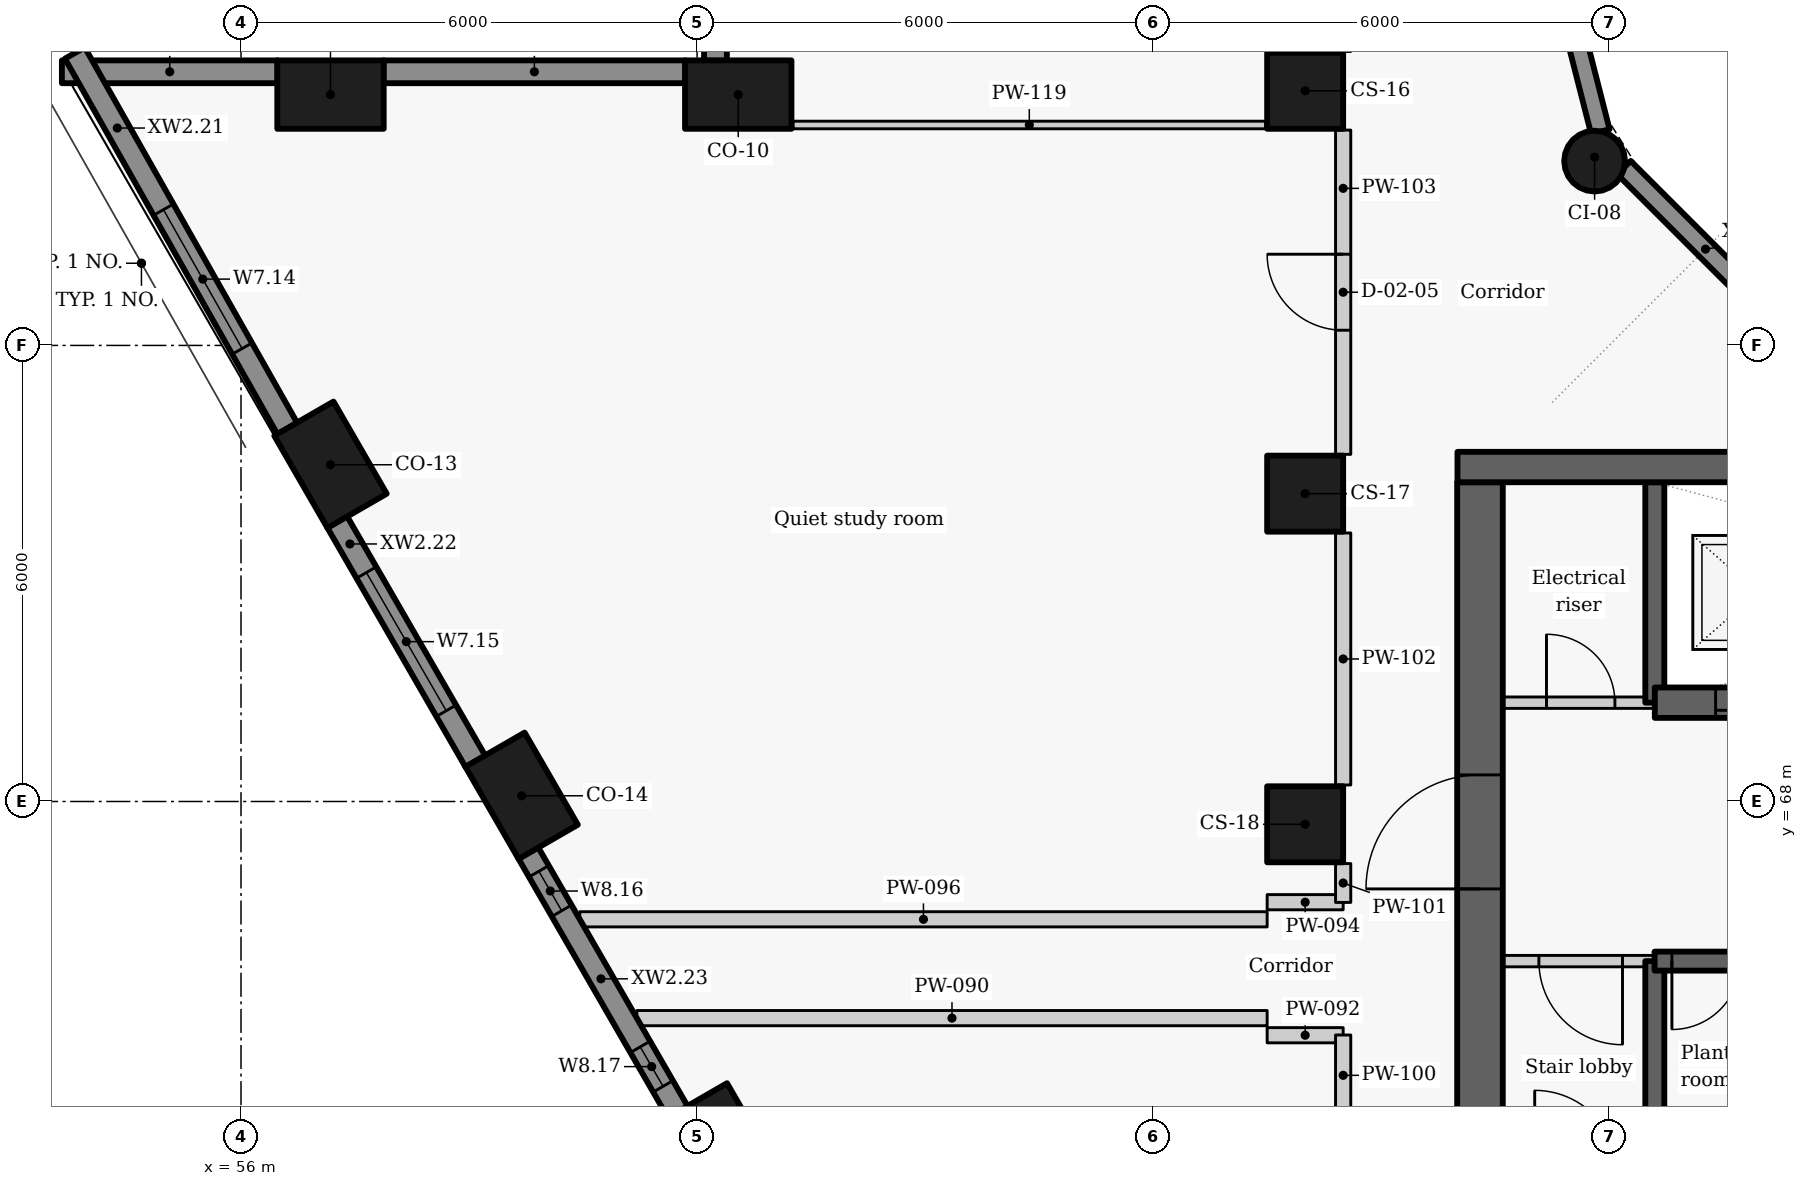
"""IFC4 building model, lengths in metres.
Left out: names, types, materials, properties, quantities, classifications, styles, units other than length and angle.
Written with IfcOpenShell. Run it as: python <this file> out.ifc"""

import sys

from ifc_helpers import new_model, si_unit, direction, frame, frame_2d, origin, origin_2d, place, context, subcontext, project, spatial, rectangle, circle, extrude, element, fill, save


model = new_model("IFC4")
c1 = context("Model", 3, precision=1e-05, world=origin(), true_north=direction((0.0, 1.0)))
c2 = subcontext(c1, "Body", "Model", "MODEL_VIEW")
j1 = project(units=[si_unit("LENGTHUNIT", "METRE"), si_unit("PLANEANGLEUNIT", "RADIAN")], contexts=[c1])
p1 = place(None, origin())
s1 = spatial("IfcSite", under=j1, at=p1, CompositionType="ELEMENT")
p2 = place(p1, origin())
s2 = spatial("IfcBuilding", under=s1, at=p2, CompositionType="ELEMENT")
p3 = place(p2, frame((0.0, 0.0, 117.3)))
s3 = spatial("IfcBuildingStorey", under=s2, at=p3, CompositionType="ELEMENT", Elevation=117.3)
for number, where, z_axis, x_axis in (
    (1, (62.542, 77.3, 0.0), (0.0, 0.0, 1.0), (-1.0, 0.0, 0.0)),
    (2, (57.177, 77.3, 0.0), (0.0, 0.0, 1.0), (-1.0, 0.0, 0.0)),
    (3, (57.177, 72.43, 0.0), (0.0, 0.0, 1.0), (0.5, -0.866, 0.0)),
    (4, (59.692, 68.075, 0.0), (0.0, 0.0, 1.0), (0.5, -0.866, 0.0)),
    (5, (62.354, 63.463, 0.0), (0.0, 0.0, 1.0), (0.5, -0.866, 0.0)),
):
    element("IfcColumn", number, at=place(p3, frame(where, z_axis=z_axis, x_axis=x_axis)), inside=s3, PredefinedType="COLUMN", context=c2, shape_type="SweptSolid", body=[
        extrude(rectangle(XDim=1.4, YDim=0.9, at=origin_2d()), origin(), (0.0, 0.0, 1.0), 3.3),
    ])
for number, where, z_axis, x_axis in (
    (6, (70.0, 77.35, 0.0), (0.0, 0.0, 1.0), (0.0, -1.0, 0.0)),
    (7, (70.0, 72.05, 0.0), (0.0, 0.0, 1.0), (0.0, -1.0, 0.0)),
    (8, (70.0, 67.7, 0.0), (0.0, 0.0, 1.0), (0.0, -1.0, 0.0)),
):
    element("IfcColumn", number, at=place(p3, frame(where, z_axis=z_axis, x_axis=x_axis)), inside=s3, PredefinedType="COLUMN", context=c2, shape_type="SweptSolid", body=[
        extrude(rectangle(XDim=1.0, YDim=1.0, at=origin_2d()), origin(), (0.0, 0.0, 1.0), 3.3),
    ])
p4 = place(p3, frame((73.808, 76.425, 0.0), z_axis=(0.0, 0.0, 1.0), x_axis=(0.5, -0.866025403784, 0.0)))
e9 = element("IfcColumn", 9, at=p4, inside=s3, PredefinedType="COLUMN", context=c2, shape_type="SweptSolid", body=[
    extrude(circle(Radius=0.4, at=origin_2d()), origin(), (0.0, 0.0, 1.0), 3.3),
])
p5 = place(p3, frame((62.242, 82.004, 0.0), z_axis=(0.0, 0.0, 1.0), x_axis=(0.0, -1.0, 0.0)))
e10 = element("IfcWall", 10, at=p5, inside=s3, PredefinedType="SOLIDWALL", context=c2, shape_type="SweptSolid", body=[
    extrude(rectangle(XDim=4.258, YDim=0.3, at=frame_2d((2.129, 0.0))), origin(), (0.0, 0.0, 1.0), 2.05),
])
p6 = place(p5, frame((1.079, 0.0, 0.9)))
e11 = element("IfcOpeningElement", 11, at=p6, cuts=e10, PredefinedType="OPENING", context=c2, shape_type="SweptSolid", body=[
    extrude(rectangle(XDim=2.1, YDim=1.1, at=frame_2d((1.05, 0.55))), frame((0.0, 0.16, 0.0), z_axis=(0.0, -1.0, 0.0), x_axis=(1.0, 0.0, 0.0)), (0.0, 0.0, 1.0), 0.32),
])
p7 = place(p3, frame((61.846, 77.6, 0.0), z_axis=(0.0, 0.0, 1.0), x_axis=(-1.0, 0.0, 0.0)))
e12 = element("IfcWall", 12, at=p7, inside=s3, PredefinedType="SOLIDWALL", context=c2, shape_type="SweptSolid", body=[
    extrude(rectangle(XDim=3.973, YDim=0.3, at=frame_2d((1.986, 0.0))), origin(), (0.0, 0.0, 1.0), 2.05),
])
p8 = place(p3, frame((56.481, 77.6, 0.0), z_axis=(0.0, 0.0, 1.0), x_axis=(-1.0, 0.0, 0.0)))
e13 = element("IfcWall", 13, at=p8, inside=s3, PredefinedType="SOLIDWALL", context=c2, shape_type="SweptSolid", body=[
    extrude(rectangle(XDim=2.838, YDim=0.3, at=frame_2d((1.419, 0.0))), origin(), (0.0, 0.0, 1.0), 2.05),
])
p9 = place(p3, frame((53.814, 77.847, 0.0), z_axis=(0.0, 0.0, 1.0), x_axis=(0.492456858874, -0.870336855561, 0.0)))
e14 = element("IfcWall", 14, at=p9, inside=s3, PredefinedType="SOLIDWALL", context=c2, shape_type="SweptSolid", body=[
    extrude(rectangle(XDim=5.677, YDim=0.3, at=frame_2d((2.838, 0.0))), origin(), (0.0, 0.0, 1.0), 2.05),
])
p10 = place(p9, frame((2.367, 0.0, 0.9)))
e15 = element("IfcOpeningElement", 15, at=p10, cuts=e14, PredefinedType="OPENING", context=c2, shape_type="SweptSolid", body=[
    extrude(rectangle(XDim=2.1, YDim=1.1, at=frame_2d((1.05, 0.55))), frame((0.0, 0.16, 0.0), z_axis=(0.0, -1.0, 0.0), x_axis=(1.0, 0.0, 0.0)), (0.0, 0.0, 1.0), 0.32),
])
p11 = place(p3, frame((57.265, 71.677, 0.0), z_axis=(0.0, 0.0, 1.0), x_axis=(0.500009139881, -0.866020126807, 0.0)))
e16 = element("IfcWall", 16, at=p11, inside=s3, PredefinedType="SOLIDWALL", context=c2, shape_type="SweptSolid", body=[
    extrude(rectangle(XDim=3.637, YDim=0.3, at=frame_2d((1.818, 0.0))), origin(), (0.0, 0.0, 1.0), 2.05),
])
p12 = place(p11, frame((0.768, 0.0, 0.9)))
e17 = element("IfcOpeningElement", 17, at=p12, cuts=e16, PredefinedType="OPENING", context=c2, shape_type="SweptSolid", body=[
    extrude(rectangle(XDim=2.1, YDim=1.1, at=frame_2d((1.05, 0.55))), frame((0.0, 0.16, 0.0), z_axis=(0.0, -1.0, 0.0), x_axis=(1.0, 0.0, 0.0)), (0.0, 0.0, 1.0), 0.32),
])
p13 = place(p3, frame((59.78, 67.323, 0.0), z_axis=(0.0, 0.0, 1.0), x_axis=(0.499957037901, -0.866050206543, 0.0)))
e18 = element("IfcWall", 18, at=p13, inside=s3, PredefinedType="SOLIDWALL", context=c2, shape_type="SweptSolid", body=[
    extrude(rectangle(XDim=3.934, YDim=0.3, at=frame_2d((1.967, 0.0))), origin(), (0.0, 0.0, 1.0), 2.05),
])
p14 = place(p13, frame((0.278, 0.0, 0.9)))
e19 = element("IfcOpeningElement", 19, at=p14, cuts=e18, PredefinedType="OPENING", context=c2, shape_type="SweptSolid", body=[
    extrude(rectangle(XDim=0.6, YDim=1.1, at=frame_2d((0.3, 0.55))), frame((0.0, 0.16, 0.0), z_axis=(0.0, -1.0, 0.0), x_axis=(1.0, 0.0, 0.0)), (0.0, 0.0, 1.0), 0.32),
])
p15 = place(p13, frame((2.945, 0.0, 0.9)))
e20 = element("IfcOpeningElement", 20, at=p15, cuts=e18, PredefinedType="OPENING", context=c2, shape_type="SweptSolid", body=[
    extrude(rectangle(XDim=0.6, YDim=1.1, at=frame_2d((0.3, 0.55))), frame((0.0, 0.16, 0.0), z_axis=(0.0, -1.0, 0.0), x_axis=(1.0, 0.0, 0.0)), (0.0, 0.0, 1.0), 0.32),
])
p16 = place(p3, frame((76.339, 74.194, 0.0), z_axis=(0.0, 0.0, 1.0), x_axis=(-0.707106781187, 0.707106781187, 0.0)))
e21 = element("IfcWall", 21, at=p16, inside=s3, PredefinedType="SOLIDWALL", context=c2, shape_type="SweptSolid", body=[
    extrude(rectangle(XDim=3.033, YDim=0.25, at=frame_2d((1.517, 0.0))), origin(), (0.0, 0.0, 1.0), 2.05),
])
p17 = place(p3, frame((73.883, 76.813, 0.0), z_axis=(0.0, 0.0, 1.0), x_axis=(-0.247055971283, 0.969001211069, 0.0)))
e22 = element("IfcWall", 22, at=p17, inside=s3, PredefinedType="SOLIDWALL", context=c2, shape_type="SweptSolid", body=[
    extrude(rectangle(XDim=3.01, YDim=0.25, at=frame_2d((1.505, 0.0))), origin(), (0.0, 0.0, 1.0), 2.05),
])
p18 = place(p3, frame((74.6, 63.1, -0.275), z_axis=(0.0, 0.0, 1.0), x_axis=(0.0, 1.0, 0.0)))
e23 = element("IfcWall", 23, at=p18, inside=s3, PredefinedType="SHEAR", context=c2, shape_type="SweptSolid", body=[
    extrude(rectangle(XDim=2.8, YDim=0.25, at=frame_2d((1.4, 0.0))), origin(), (0.0, 0.0, 1.0), 3.225),
])
p19 = place(p3, frame((74.6, 69.3, -0.275), z_axis=(0.0, 0.0, 1.0), x_axis=(0.0, 1.0, 0.0)))
e24 = element("IfcWall", 24, at=p19, inside=s3, PredefinedType="SHEAR", context=c2, shape_type="SweptSolid", body=[
    extrude(rectangle(XDim=2.9, YDim=0.25, at=frame_2d((1.45, 0.0))), origin(), (0.0, 0.0, 1.0), 3.225),
])
p20 = place(p3, frame((72.0, 69.3, 0.0), z_axis=(0.0, 0.0, 1.0), x_axis=(1.0, 0.0, 0.0)))
e25 = element("IfcWall", 25, at=p20, inside=s3, PredefinedType="PARTITIONING", context=c2, shape_type="SweptSolid", body=[
    extrude(rectangle(XDim=2.6, YDim=0.15, at=frame_2d((1.3, 0.0))), origin(), (0.0, 0.0, 1.0), 2.95),
])
p21 = place(p20, frame((1.175, 0.0, 0.0)))
e26 = element("IfcOpeningElement", 26, at=p21, cuts=e25, PredefinedType="OPENING", context=c2, shape_type="SweptSolid", body=[
    extrude(rectangle(XDim=0.9, YDim=2.1, at=frame_2d((0.45, 1.05))), frame((0.0, 0.085, 0.0), z_axis=(0.0, -1.0, 0.0), x_axis=(1.0, 0.0, 0.0)), (0.0, 0.0, 1.0), 0.17),
])
p22 = place(p3, frame((72.3, 63.1, -0.275), z_axis=(0.0, 0.0, 1.0), x_axis=(0.0, 1.0, 0.0)))
e27 = element("IfcWall", 27, at=p22, inside=s3, PredefinedType="SHEAR", context=c2, shape_type="SweptSolid", body=[
    extrude(rectangle(XDim=9.1, YDim=0.6, at=frame_2d((4.55, 0.0))), origin(), (0.0, 0.0, 1.0), 3.225),
])
p23 = place(p22, frame((3.75, 0.0, 0.275)))
e28 = element("IfcOpeningElement", 28, at=p23, cuts=e27, PredefinedType="OPENING", context=c2, shape_type="SweptSolid", body=[
    extrude(rectangle(XDim=1.5, YDim=2.1, at=frame_2d((0.75, 1.05))), frame((0.0, 0.31, 0.0), z_axis=(0.0, -1.0, 0.0), x_axis=(1.0, 0.0, 0.0)), (0.0, 0.0, 1.0), 0.62),
])
p24 = place(p3, frame((74.6, 69.3, -0.275), z_axis=(0.0, 0.0, 1.0), x_axis=(1.0, 0.0, 0.0)))
e29 = element("IfcWall", 29, at=p24, inside=s3, PredefinedType="SHEAR", context=c2, shape_type="SweptSolid", body=[
    extrude(rectangle(XDim=10.8, YDim=0.4, at=frame_2d((5.4, 0.0))), origin(), (0.0, 0.0, 1.0), 3.225),
])
p25 = place(p24, frame((0.8, 0.0, 0.275)))
e30 = element("IfcOpeningElement", 30, at=p25, cuts=e29, PredefinedType="OPENING", context=c2, shape_type="SweptSolid", body=[
    extrude(rectangle(XDim=1.1, YDim=2.1, at=frame_2d((0.55, 1.05))), frame((0.0, 0.21, 0.0), z_axis=(0.0, -1.0, 0.0), x_axis=(1.0, 0.0, 0.0)), (0.0, 0.0, 1.0), 0.42),
])
p26 = place(p24, frame((3.5, 0.0, 0.275)))
e31 = element("IfcOpeningElement", 31, at=p26, cuts=e29, PredefinedType="OPENING", context=c2, shape_type="SweptSolid", body=[
    extrude(rectangle(XDim=1.1, YDim=2.1, at=frame_2d((0.55, 1.05))), frame((0.0, 0.21, 0.0), z_axis=(0.0, -1.0, 0.0), x_axis=(1.0, 0.0, 0.0)), (0.0, 0.0, 1.0), 0.42),
])
p27 = place(p24, frame((6.2, 0.0, 0.275)))
e32 = element("IfcOpeningElement", 32, at=p27, cuts=e29, PredefinedType="OPENING", context=c2, shape_type="SweptSolid", body=[
    extrude(rectangle(XDim=1.1, YDim=2.1, at=frame_2d((0.55, 1.05))), frame((0.0, 0.21, 0.0), z_axis=(0.0, -1.0, 0.0), x_axis=(1.0, 0.0, 0.0)), (0.0, 0.0, 1.0), 0.42),
])
p28 = place(p3, frame((74.603, 65.9, 0.0), z_axis=(0.0, 0.0, 1.0), x_axis=(-1.0, 0.0, 0.0)))
e33 = element("IfcWall", 33, at=p28, inside=s3, PredefinedType="PARTITIONING", context=c2, shape_type="SweptSolid", body=[
    extrude(rectangle(XDim=2.603, YDim=0.15, at=frame_2d((1.302, 0.0))), origin(), (0.0, 0.0, 1.0), 2.95),
])
p29 = place(p28, frame((0.428, 0.0, 0.0)))
e34 = element("IfcOpeningElement", 34, at=p29, cuts=e33, PredefinedType="OPENING", context=c2, shape_type="SweptSolid", body=[
    extrude(rectangle(XDim=1.1, YDim=2.1, at=frame_2d((0.55, 1.05))), frame((0.0, 0.085, 0.0), z_axis=(0.0, -1.0, 0.0), x_axis=(1.0, 0.0, 0.0)), (0.0, 0.0, 1.0), 0.17),
])
p30 = place(p3, frame((77.303, 65.9, -0.275), z_axis=(0.0, 0.0, 1.0), x_axis=(-1.0, 0.0, 0.0)))
e35 = element("IfcWall", 35, at=p30, inside=s3, PredefinedType="SHEAR", context=c2, shape_type="SweptSolid", body=[
    extrude(rectangle(XDim=2.706, YDim=0.25, at=frame_2d((1.353, 0.0))), origin(), (0.0, 0.0, 1.0), 3.225),
])
p31 = place(p30, frame((1.578, 0.0, 0.275)))
e36 = element("IfcOpeningElement", 36, at=p31, cuts=e35, PredefinedType="OPENING", context=c2, shape_type="SweptSolid", body=[
    extrude(rectangle(XDim=0.9, YDim=2.1, at=frame_2d((0.45, 1.05))), frame((0.0, 0.135, 0.0), z_axis=(0.0, -1.0, 0.0), x_axis=(1.0, 0.0, 0.0)), (0.0, 0.0, 1.0), 0.27),
])
p32 = place(p30, frame((0.228, 0.0, 0.275)))
e37 = element("IfcOpeningElement", 37, at=p32, cuts=e35, PredefinedType="OPENING", context=c2, shape_type="SweptSolid", body=[
    extrude(rectangle(XDim=0.9, YDim=2.1, at=frame_2d((0.45, 1.05))), frame((0.0, 0.135, 0.0), z_axis=(0.0, -1.0, 0.0), x_axis=(1.0, 0.0, 0.0)), (0.0, 0.0, 1.0), 0.27),
])
p33 = place(p3, frame((61.207, 65.15, 0.0), z_axis=(0.0, 0.0, 1.0), x_axis=(1.0, 0.0, 0.0)))
e38 = element("IfcWall", 38, at=p33, inside=s3, PredefinedType="PARTITIONING", context=c2, shape_type="SweptSolid", body=[
    extrude(rectangle(XDim=8.293, YDim=0.2, at=frame_2d((4.146, 0.0))), origin(), (0.0, 0.0, 1.0), 2.03),
])
for number, where, z_axis, x_axis in (
    (39, (69.5, 64.925, 0.0), (0.0, 0.0, 1.0), (1.0, 0.0, 0.0)),
    (40, (69.5, 66.675, 0.0), (0.0, 0.0, 1.0), (1.0, 0.0, 0.0)),
):
    element("IfcWall", number, at=place(p3, frame(where, z_axis=z_axis, x_axis=x_axis)), inside=s3, PredefinedType="PARTITIONING", context=c2, shape_type="SweptSolid", body=[
        extrude(rectangle(XDim=1.0, YDim=0.2, at=frame_2d((0.5, 0.0))), origin(), (0.0, 0.0, 1.0), 2.43),
    ])
p34 = place(p3, frame((60.457, 66.45, 0.0), z_axis=(0.0, 0.0, 1.0), x_axis=(1.0, 0.0, 0.0)))
e41 = element("IfcWall", 41, at=p34, inside=s3, PredefinedType="PARTITIONING", context=c2, shape_type="SweptSolid", body=[
    extrude(rectangle(XDim=9.043, YDim=0.2, at=frame_2d((4.521, 0.0))), origin(), (0.0, 0.0, 1.0), 2.03),
])
p35 = place(p3, frame((70.5, 63.867, 0.0), z_axis=(0.0, 0.0, 1.0), x_axis=(0.0, 1.0, 0.0)))
e42 = element("IfcWall", 42, at=p35, inside=s3, PredefinedType="PARTITIONING", context=c2, shape_type="SweptSolid", body=[
    extrude(rectangle(XDim=1.061, YDim=0.2, at=frame_2d((0.531, 0.0))), origin(), (0.0, 0.0, 1.0), 2.95),
])
p36 = place(p3, frame((70.5, 66.672, 0.0), z_axis=(0.0, 0.0, 1.0), x_axis=(0.0, 1.0, 0.0)))
e43 = element("IfcWall", 43, at=p36, inside=s3, PredefinedType="PARTITIONING", context=c2, shape_type="SweptSolid", body=[
    extrude(rectangle(XDim=0.511, YDim=0.2, at=frame_2d((0.255, 0.0))), origin(), (0.0, 0.0, 1.0), 2.95),
])
p37 = place(p3, frame((70.5, 68.217, 0.0), z_axis=(0.0, 0.0, 1.0), x_axis=(0.0, 1.0, 0.0)))
e44 = element("IfcWall", 44, at=p37, inside=s3, PredefinedType="PARTITIONING", context=c2, shape_type="SweptSolid", body=[
    extrude(rectangle(XDim=3.316, YDim=0.2, at=frame_2d((1.658, 0.0))), origin(), (0.0, 0.0, 1.0), 2.95),
])
p38 = place(p3, frame((70.5, 72.567, 0.0), z_axis=(0.0, 0.0, 1.0), x_axis=(0.0, 1.0, 0.0)))
e45 = element("IfcWall", 45, at=p38, inside=s3, PredefinedType="PARTITIONING", context=c2, shape_type="SweptSolid", body=[
    extrude(rectangle(XDim=4.266, YDim=0.2, at=frame_2d((2.133, 0.0))), origin(), (0.0, 0.0, 1.0), 2.95),
])
p39 = place(p38, frame((1.633, 0.0, 0.0)))
e46 = element("IfcOpeningElement", 46, at=p39, cuts=e45, PredefinedType="OPENING", context=c2, shape_type="SweptSolid", body=[
    extrude(rectangle(XDim=1.0, YDim=2.1, at=frame_2d((0.5, 1.05))), frame((0.0, 0.11, 0.0), z_axis=(0.0, -1.0, 0.0), x_axis=(1.0, 0.0, 0.0)), (0.0, 0.0, 1.0), 0.22),
])
p40 = place(p3, frame((63.262, 76.9, 0.0), z_axis=(0.0, 0.0, 1.0), x_axis=(1.0, 0.0, 0.0)))
e47 = element("IfcWall", 47, at=p40, inside=s3, PredefinedType="PARTITIONING", context=c2, shape_type="SweptSolid", body=[
    extrude(rectangle(XDim=6.218, YDim=0.1, at=frame_2d((3.109, 0.0))), origin(), (0.0, 0.0, 1.0), 2.95),
])
p41 = place(p3, frame((72.004, 72.4, -0.275), z_axis=(0.0, 0.0, 1.0), x_axis=(1.0, 0.0, 0.0)))
e48 = element("IfcWall", 48, at=p41, inside=s3, PredefinedType="SHEAR", context=c2, shape_type="SweptSolid", body=[
    extrude(rectangle(XDim=15.992, YDim=0.4, at=frame_2d((7.996, 0.0))), origin(), (0.0, 0.0, 1.0), 3.225),
])
p42 = place(p10, origin())
e49 = element("IfcWindow", 49, at=p42, inside=s3, PartitioningType="SINGLE_PANEL", PredefinedType="WINDOW", context=c2, shape_type="SweptSolid", body=[
    extrude(rectangle(XDim=2.1, YDim=1.1, at=frame_2d((1.05, 0.55))), frame((0.0, 0.03, 0.0), z_axis=(0.0, -1.0, 0.0), x_axis=(1.0, 0.0, 0.0)), (0.0, 0.0, 1.0), 0.06),
])
fill(e15, e49)
p43 = place(p12, origin())
e50 = element("IfcWindow", 50, at=p43, inside=s3, PartitioningType="SINGLE_PANEL", PredefinedType="WINDOW", context=c2, shape_type="SweptSolid", body=[
    extrude(rectangle(XDim=2.1, YDim=1.1, at=frame_2d((1.05, 0.55))), frame((0.0, 0.03, 0.0), z_axis=(0.0, -1.0, 0.0), x_axis=(1.0, 0.0, 0.0)), (0.0, 0.0, 1.0), 0.06),
])
fill(e17, e50)
p44 = place(p14, origin())
e51 = element("IfcWindow", 51, at=p44, inside=s3, PartitioningType="SINGLE_PANEL", PredefinedType="WINDOW", context=c2, shape_type="SweptSolid", body=[
    extrude(rectangle(XDim=0.6, YDim=1.1, at=frame_2d((0.3, 0.55))), frame((0.0, 0.03, 0.0), z_axis=(0.0, -1.0, 0.0), x_axis=(1.0, 0.0, 0.0)), (0.0, 0.0, 1.0), 0.06),
])
fill(e19, e51)
p45 = place(p15, origin())
e52 = element("IfcWindow", 52, at=p45, inside=s3, PartitioningType="SINGLE_PANEL", PredefinedType="WINDOW", context=c2, shape_type="SweptSolid", body=[
    extrude(rectangle(XDim=0.6, YDim=1.1, at=frame_2d((0.3, 0.55))), frame((0.0, 0.03, 0.0), z_axis=(0.0, -1.0, 0.0), x_axis=(1.0, 0.0, 0.0)), (0.0, 0.0, 1.0), 0.06),
])
fill(e20, e52)
p46 = place(p21, origin())
e53 = element("IfcDoor", 53, at=p46, inside=s3, OperationType="SINGLE_SWING_LEFT", PredefinedType="DOOR", context=c2, shape_type="SweptSolid", body=[
    extrude(rectangle(XDim=0.9, YDim=2.1, at=frame_2d((0.45, 1.05))), frame((0.0, 0.025, 0.0), z_axis=(0.0, -1.0, 0.0), x_axis=(1.0, 0.0, 0.0)), (0.0, 0.0, 1.0), 0.05),
])
fill(e26, e53)
p47 = place(p25, origin())
e54 = element("IfcDoor", 54, at=p47, inside=s3, OperationType="SLIDING_TO_LEFT", PredefinedType="DOOR", context=c2, shape_type="SweptSolid", body=[
    extrude(rectangle(XDim=1.1, YDim=2.1, at=frame_2d((0.55, 1.05))), frame((0.0, 0.025, 0.0), z_axis=(0.0, -1.0, 0.0), x_axis=(1.0, 0.0, 0.0)), (0.0, 0.0, 1.0), 0.05),
])
fill(e30, e54)
p48 = place(p29, origin())
e55 = element("IfcDoor", 55, at=p48, inside=s3, OperationType="SINGLE_SWING_LEFT", PredefinedType="DOOR", context=c2, shape_type="SweptSolid", body=[
    extrude(rectangle(XDim=1.1, YDim=2.1, at=frame_2d((0.55, 1.05))), frame((0.0, 0.025, 0.0), z_axis=(0.0, -1.0, 0.0), x_axis=(1.0, 0.0, 0.0)), (0.0, 0.0, 1.0), 0.05),
])
fill(e34, e55)
p49 = place(p31, origin())
e56 = element("IfcDoor", 56, at=p49, inside=s3, OperationType="SINGLE_SWING_RIGHT", PredefinedType="DOOR", context=c2, shape_type="SweptSolid", body=[
    extrude(rectangle(XDim=0.9, YDim=2.1, at=frame_2d((0.45, 1.05))), frame((0.0, 0.025, 0.0), z_axis=(0.0, -1.0, 0.0), x_axis=(1.0, 0.0, 0.0)), (0.0, 0.0, 1.0), 0.05),
])
fill(e36, e56)
p50 = place(p39, origin())
e57 = element("IfcDoor", 57, at=p50, inside=s3, OperationType="SINGLE_SWING_RIGHT", PredefinedType="DOOR", context=c2, shape_type="SweptSolid", body=[
    extrude(rectangle(XDim=1.0, YDim=2.1, at=frame_2d((0.5, 1.05))), frame((0.0, 0.025, 0.0), z_axis=(0.0, -1.0, 0.0), x_axis=(1.0, 0.0, 0.0)), (0.0, 0.0, 1.0), 0.05),
])
fill(e46, e57)
p51 = place(p23, origin())
e58 = element("IfcDoor", 58, at=p51, inside=s3, OperationType="DOUBLE_DOOR_SINGLE_SWING", PredefinedType="DOOR", context=c2, shape_type="SweptSolid", body=[
    extrude(rectangle(XDim=1.5, YDim=2.1, at=frame_2d((0.75, 1.05))), frame((0.0, 0.025, 0.0), z_axis=(0.0, -1.0, 0.0), x_axis=(1.0, 0.0, 0.0)), (0.0, 0.0, 1.0), 0.05),
])
fill(e28, e58)
save(model, sys.argv[1])
